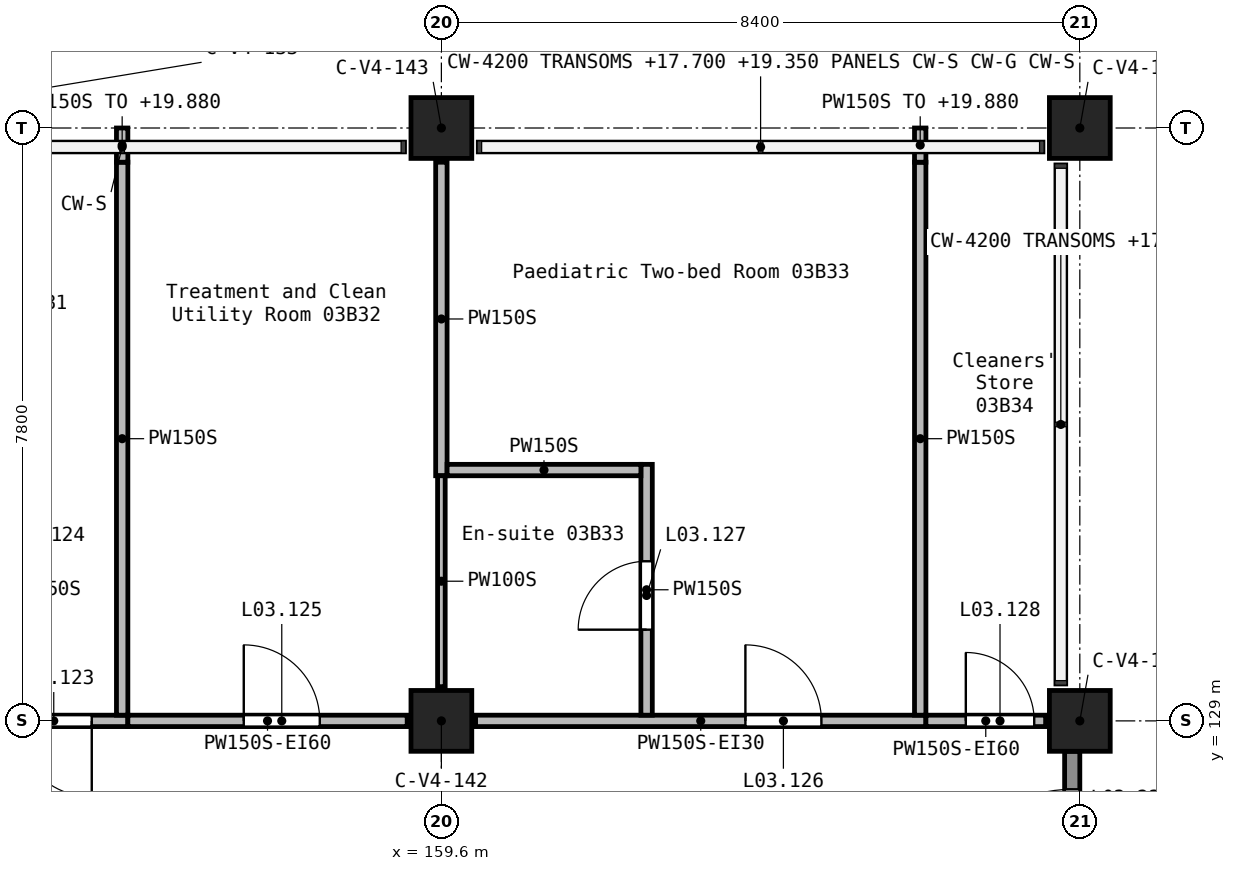
"""IFC4 building model, lengths in metres.
Left out: names, types, materials, properties, quantities, classifications, styles, units other than length and angle.
Written with IfcOpenShell. Run it as: python <this file> out.ifc"""

import sys

from ifc_helpers import new_model, si_unit, direction, frame, frame_2d, origin, origin_2d, place, context, subcontext, project, spatial, rectangle, extrude, element, fill, save


model = new_model("IFC4")
c1 = context("Model", 3, precision=1e-05, world=origin(), true_north=direction((0.0, 1.0)))
c2 = subcontext(c1, "Body", "Model", "MODEL_VIEW")
j1 = project(units=[si_unit("LENGTHUNIT", "METRE"), si_unit("PLANEANGLEUNIT", "RADIAN")], contexts=[c1])
p1 = place(None, origin())
s1 = spatial("IfcSite", under=j1, at=p1, CompositionType="ELEMENT")
p2 = place(p1, origin())
s2 = spatial("IfcBuilding", under=s1, at=p2, CompositionType="ELEMENT")
p3 = place(p2, frame((0.0, 0.0, 16.8)))
s3 = spatial("IfcBuildingStorey", under=s2, at=p3, CompositionType="ELEMENT", Elevation=16.8)
for number, where, z_axis, x_axis in (
    (1, (159.6, 129.0, 0.0), (0.0, 0.0, 1.0), (1.0, 0.0, 0.0)),
    (2, (159.6, 136.8, 0.0), (0.0, 0.0, 1.0), (1.0, 0.0, 0.0)),
    (3, (168.0, 129.0, 0.0), (0.0, 0.0, 1.0), (1.0, 0.0, 0.0)),
    (4, (168.0, 136.8, 0.0), (0.0, 0.0, 1.0), (1.0, 0.0, 0.0)),
):
    element("IfcColumn", number, at=place(p3, frame(where, z_axis=z_axis, x_axis=x_axis)), inside=s3, PredefinedType="COLUMN", context=c2, shape_type="SweptSolid", body=[
        extrude(rectangle(XDim=0.8, YDim=0.8, at=origin_2d()), origin(), (0.0, 0.0, 1.0), 4.2),
    ])
p4 = place(p3, frame((167.9, 125.8, 0.0), z_axis=(0.0, 0.0, 1.0), x_axis=(0.0, 1.0, 0.0)))
e5 = element("IfcWall", 5, at=p4, inside=s3, PredefinedType="STANDARD", context=c2, shape_type="SweptSolid", body=[
    extrude(rectangle(XDim=2.8, YDim=0.2, at=frame_2d((1.4, 0.0))), origin(), (0.0, 0.0, 1.0), 3.05),
])
p5 = place(p4, frame((0.5, 0.0, 0.0)))
e6 = element("IfcOpeningElement", 6, at=p5, cuts=e5, PredefinedType="OPENING", context=c2, shape_type="SweptSolid", body=[
    extrude(rectangle(XDim=1.8, YDim=2.4, at=frame_2d((0.9, 1.2))), frame((0.0, 0.11, 0.0), z_axis=(0.0, -1.0, 0.0), x_axis=(1.0, 0.0, 0.0)), (0.0, 0.0, 1.0), 0.22),
])
p6 = place(p3, frame((155.475, 129.0, 0.0), z_axis=(0.0, 0.0, 1.0), x_axis=(-1.0, 0.0, 0.0)))
e7 = element("IfcWall", 7, at=p6, inside=s3, PredefinedType="PARTITIONING", context=c2, shape_type="SweptSolid", body=[
    extrude(rectangle(XDim=3.825, YDim=0.15, at=frame_2d((1.913, 0.0))), origin(), (0.0, 0.0, 1.0), 3.9),
])
p7 = place(p6, frame((0.475, 0.0, 0.0)))
e8 = element("IfcOpeningElement", 8, at=p7, cuts=e7, PredefinedType="OPENING", context=c2, shape_type="SweptSolid", body=[
    extrude(rectangle(XDim=1.0, YDim=2.1, at=frame_2d((0.5, 1.05))), frame((0.0, 0.085, 0.0), z_axis=(0.0, -1.0, 0.0), x_axis=(1.0, 0.0, 0.0)), (0.0, 0.0, 1.0), 0.17),
])
p8 = place(p3, frame((160.05, 129.0, 0.0), z_axis=(0.0, 0.0, 1.0), x_axis=(1.0, 0.0, 0.0)))
e9 = element("IfcWall", 9, at=p8, inside=s3, PredefinedType="PARTITIONING", context=c2, shape_type="SweptSolid", body=[
    extrude(rectangle(XDim=5.925, YDim=0.15, at=frame_2d((2.962, 0.0))), origin(), (0.0, 0.0, 1.0), 3.9),
])
p9 = place(p8, frame((3.55, 0.0, 0.0)))
e10 = element("IfcOpeningElement", 10, at=p9, cuts=e9, PredefinedType="OPENING", context=c2, shape_type="SweptSolid", body=[
    extrude(rectangle(XDim=1.0, YDim=2.1, at=frame_2d((0.5, 1.05))), frame((0.0, 0.085, 0.0), z_axis=(0.0, -1.0, 0.0), x_axis=(1.0, 0.0, 0.0)), (0.0, 0.0, 1.0), 0.17),
])
p10 = place(p3, frame((155.475, 129.0, 0.0), z_axis=(0.0, 0.0, 1.0), x_axis=(1.0, 0.0, 0.0)))
e11 = element("IfcWall", 11, at=p10, inside=s3, PredefinedType="PARTITIONING", context=c2, shape_type="SweptSolid", body=[
    extrude(rectangle(XDim=3.675, YDim=0.15, at=frame_2d((1.837, 0.0))), origin(), (0.0, 0.0, 1.0), 3.9),
])
p11 = place(p10, frame((1.525, 0.0, 0.0)))
e12 = element("IfcOpeningElement", 12, at=p11, cuts=e11, PredefinedType="OPENING", context=c2, shape_type="SweptSolid", body=[
    extrude(rectangle(XDim=1.0, YDim=2.1, at=frame_2d((0.5, 1.05))), frame((0.0, 0.085, 0.0), z_axis=(0.0, -1.0, 0.0), x_axis=(1.0, 0.0, 0.0)), (0.0, 0.0, 1.0), 0.17),
])
p12 = place(p3, frame((165.975, 129.0, 0.0), z_axis=(0.0, 0.0, 1.0), x_axis=(1.0, 0.0, 0.0)))
e13 = element("IfcWall", 13, at=p12, inside=s3, PredefinedType="PARTITIONING", context=c2, shape_type="SweptSolid", body=[
    extrude(rectangle(XDim=1.575, YDim=0.15, at=frame_2d((0.788, 0.0))), origin(), (0.0, 0.0, 1.0), 3.9),
])
p13 = place(p12, frame((0.525, 0.0, 0.0)))
e14 = element("IfcOpeningElement", 14, at=p13, cuts=e13, PredefinedType="OPENING", context=c2, shape_type="SweptSolid", body=[
    extrude(rectangle(XDim=0.9, YDim=2.1, at=frame_2d((0.45, 1.05))), frame((0.0, 0.085, 0.0), z_axis=(0.0, -1.0, 0.0), x_axis=(1.0, 0.0, 0.0)), (0.0, 0.0, 1.0), 0.17),
])
p14 = place(p3, frame((155.4, 129.075, 0.0), z_axis=(0.0, 0.0, 1.0), x_axis=(0.0, 1.0, 0.0)))
e15 = element("IfcWall", 15, at=p14, inside=s3, PredefinedType="PARTITIONING", context=c2, shape_type="SweptSolid", body=[
    extrude(rectangle(XDim=7.275, YDim=0.15, at=frame_2d((3.638, 0.0))), origin(), (0.0, 0.0, 1.0), 3.9),
])
p15 = place(p3, frame((155.4, 136.35, 0.0), z_axis=(0.0, 0.0, 1.0), x_axis=(0.0, 1.0, 0.0)))
e16 = element("IfcWall", 16, at=p15, inside=s3, PredefinedType="PARTITIONING", context=c2, shape_type="SweptSolid", body=[
    extrude(rectangle(XDim=0.45, YDim=0.15, at=frame_2d((0.225, 0.0))), origin(), (0.0, 0.0, 1.0), 3.08),
])
p16 = place(p3, frame((165.9, 129.075, 0.0), z_axis=(0.0, 0.0, 1.0), x_axis=(0.0, 1.0, 0.0)))
e17 = element("IfcWall", 17, at=p16, inside=s3, PredefinedType="PARTITIONING", context=c2, shape_type="SweptSolid", body=[
    extrude(rectangle(XDim=7.275, YDim=0.15, at=frame_2d((3.638, 0.0))), origin(), (0.0, 0.0, 1.0), 3.9),
])
p17 = place(p3, frame((165.9, 136.35, 0.0), z_axis=(0.0, 0.0, 1.0), x_axis=(0.0, 1.0, 0.0)))
e18 = element("IfcWall", 18, at=p17, inside=s3, PredefinedType="PARTITIONING", context=c2, shape_type="SweptSolid", body=[
    extrude(rectangle(XDim=0.45, YDim=0.15, at=frame_2d((0.225, 0.0))), origin(), (0.0, 0.0, 1.0), 3.08),
])
p18 = place(p3, frame((159.6, 132.225, 0.0), z_axis=(0.0, 0.0, 1.0), x_axis=(0.0, 1.0, 0.0)))
e19 = element("IfcWall", 19, at=p18, inside=s3, PredefinedType="PARTITIONING", context=c2, shape_type="SweptSolid", body=[
    extrude(rectangle(XDim=4.125, YDim=0.15, at=frame_2d((2.062, 0.0))), origin(), (0.0, 0.0, 1.0), 3.9),
])
p19 = place(p3, frame((162.3, 129.075, 0.0), z_axis=(0.0, 0.0, 1.0), x_axis=(0.0, 1.0, 0.0)))
e20 = element("IfcWall", 20, at=p19, inside=s3, PredefinedType="PARTITIONING", context=c2, shape_type="SweptSolid", body=[
    extrude(rectangle(XDim=3.3, YDim=0.15, at=frame_2d((1.65, 0.0))), origin(), (0.0, 0.0, 1.0), 3.9),
])
p20 = place(p19, frame((1.125, 0.0, 0.0)))
e21 = element("IfcOpeningElement", 21, at=p20, cuts=e20, PredefinedType="OPENING", context=c2, shape_type="SweptSolid", body=[
    extrude(rectangle(XDim=0.9, YDim=2.1, at=frame_2d((0.45, 1.05))), frame((0.0, 0.085, 0.0), z_axis=(0.0, -1.0, 0.0), x_axis=(1.0, 0.0, 0.0)), (0.0, 0.0, 1.0), 0.17),
])
p21 = place(p3, frame((159.675, 132.3, 0.0), z_axis=(0.0, 0.0, 1.0), x_axis=(1.0, 0.0, 0.0)))
e22 = element("IfcWall", 22, at=p21, inside=s3, PredefinedType="PARTITIONING", context=c2, shape_type="SweptSolid", body=[
    extrude(rectangle(XDim=2.55, YDim=0.15, at=frame_2d((1.275, 0.0))), origin(), (0.0, 0.0, 1.0), 3.9),
])
p22 = place(p3, frame((159.6, 129.45, 0.0), z_axis=(0.0, 0.0, 1.0), x_axis=(0.0, 1.0, 0.0)))
e23 = element("IfcWall", 23, at=p22, inside=s3, PredefinedType="PARTITIONING", context=c2, shape_type="SweptSolid", body=[
    extrude(rectangle(XDim=2.775, YDim=0.1, at=frame_2d((1.388, 0.0))), origin(), (0.0, 0.0, 1.0), 3.9),
])
p23 = place(p5, frame((1.8, 0.0, 0.0), z_axis=(0.0, 0.0, 1.0), x_axis=(-1.0, 0.0, 0.0)))
e24 = element("IfcDoor", 24, at=p23, inside=s3, OperationType="SINGLE_SWING_LEFT", PredefinedType="DOOR", context=c2, shape_type="SweptSolid", body=[
    extrude(rectangle(XDim=1.8, YDim=2.4, at=frame_2d((0.9, 1.2))), frame((0.0, 0.025, 0.0), z_axis=(0.0, -1.0, 0.0), x_axis=(1.0, 0.0, 0.0)), (0.0, 0.0, 1.0), 0.05),
])
fill(e6, e24)
p24 = place(p7, frame((1.0, 0.0, 0.0), z_axis=(0.0, 0.0, 1.0), x_axis=(-1.0, 0.0, 0.0)))
e25 = element("IfcDoor", 25, at=p24, inside=s3, OperationType="SINGLE_SWING_RIGHT", PredefinedType="DOOR", context=c2, shape_type="SweptSolid", body=[
    extrude(rectangle(XDim=1.0, YDim=2.1, at=frame_2d((0.5, 1.05))), frame((0.0, 0.025, 0.0), z_axis=(0.0, -1.0, 0.0), x_axis=(1.0, 0.0, 0.0)), (0.0, 0.0, 1.0), 0.05),
])
fill(e8, e25)
p25 = place(p11, origin())
e26 = element("IfcDoor", 26, at=p25, inside=s3, OperationType="SINGLE_SWING_RIGHT", PredefinedType="DOOR", context=c2, shape_type="SweptSolid", body=[
    extrude(rectangle(XDim=1.0, YDim=2.1, at=frame_2d((0.5, 1.05))), frame((0.0, 0.025, 0.0), z_axis=(0.0, -1.0, 0.0), x_axis=(1.0, 0.0, 0.0)), (0.0, 0.0, 1.0), 0.05),
])
fill(e12, e26)
p26 = place(p9, origin())
e27 = element("IfcDoor", 27, at=p26, inside=s3, OperationType="SINGLE_SWING_RIGHT", PredefinedType="DOOR", context=c2, shape_type="SweptSolid", body=[
    extrude(rectangle(XDim=1.0, YDim=2.1, at=frame_2d((0.5, 1.05))), frame((0.0, 0.025, 0.0), z_axis=(0.0, -1.0, 0.0), x_axis=(1.0, 0.0, 0.0)), (0.0, 0.0, 1.0), 0.05),
])
fill(e10, e27)
p27 = place(p20, origin())
e28 = element("IfcDoor", 28, at=p27, inside=s3, OperationType="SINGLE_SWING_LEFT", PredefinedType="DOOR", context=c2, shape_type="SweptSolid", body=[
    extrude(rectangle(XDim=0.9, YDim=2.1, at=frame_2d((0.45, 1.05))), frame((0.0, 0.025, 0.0), z_axis=(0.0, -1.0, 0.0), x_axis=(1.0, 0.0, 0.0)), (0.0, 0.0, 1.0), 0.05),
])
fill(e21, e28)
p28 = place(p13, origin())
e29 = element("IfcDoor", 29, at=p28, inside=s3, OperationType="SINGLE_SWING_RIGHT", PredefinedType="DOOR", context=c2, shape_type="SweptSolid", body=[
    extrude(rectangle(XDim=0.9, YDim=2.1, at=frame_2d((0.45, 1.05))), frame((0.0, 0.025, 0.0), z_axis=(0.0, -1.0, 0.0), x_axis=(1.0, 0.0, 0.0)), (0.0, 0.0, 1.0), 0.05),
])
fill(e14, e29)
save(model, sys.argv[1])
